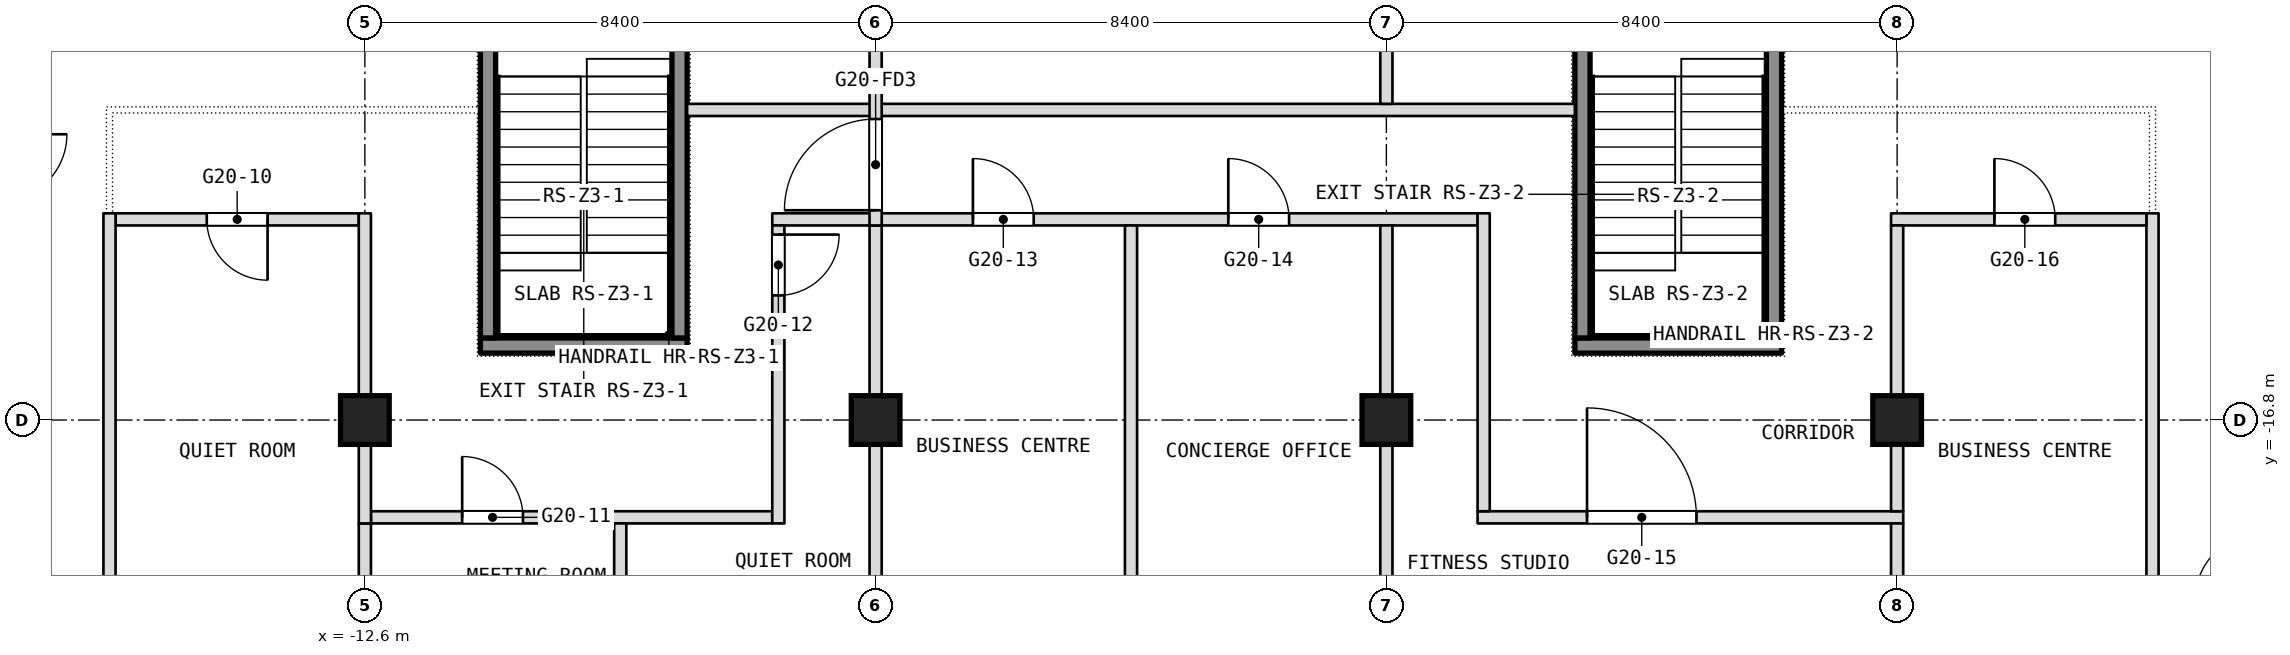
"""IFC4 building model, lengths in metres.
Left out: names, types, materials, properties, quantities, classifications, styles, units other than length and angle.
Written with IfcOpenShell. Run it as: python <this file> out.ifc"""

import sys

from ifc_helpers import new_model, si_unit, direction, frame, frame_2d, origin, origin_2d, place, context, subcontext, project, spatial, rectangle, extrude, element, fill, save


model = new_model("IFC4")
c1 = context("Model", 3, precision=1e-05, world=origin(), true_north=direction((0.0, 1.0)))
c2 = subcontext(c1, "Body", "Model", "MODEL_VIEW")
j1 = project(units=[si_unit("LENGTHUNIT", "METRE"), si_unit("PLANEANGLEUNIT", "RADIAN")], contexts=[c1])
p1 = place(None, origin())
s1 = spatial("IfcSite", under=j1, at=p1, CompositionType="ELEMENT")
p2 = place(p1, origin())
s2 = spatial("IfcBuilding", under=s1, at=p2, CompositionType="ELEMENT")
p3 = place(p2, frame((0.0, 0.0, 238.1)))
s3 = spatial("IfcBuildingStorey", under=s2, at=p3, CompositionType="ELEMENT", Elevation=238.1)
for number, where, z_axis, x_axis in (
    (1, (-12.6, -16.8, 0.0), (0.0, 0.0, 1.0), (1.0, 0.0, 0.0)),
    (2, (-4.2, -16.8, 0.0), (0.0, 0.0, 1.0), (1.0, 0.0, 0.0)),
    (3, (4.2, -16.8, 0.0), (0.0, 0.0, 1.0), (1.0, 0.0, 0.0)),
    (4, (12.6, -16.8, 0.0), (0.0, 0.0, 1.0), (1.0, 0.0, 0.0)),
):
    element("IfcColumn", number, at=place(p3, frame(where, z_axis=z_axis, x_axis=x_axis)), inside=s3, PredefinedType="COLUMN", context=c2, shape_type="SweptSolid", body=[
        extrude(rectangle(XDim=0.8, YDim=0.8, at=origin_2d()), origin(), (0.0, 0.0, 1.0), 3.6),
    ])
p4 = place(p3, frame((-12.5, -18.4, 0.0), z_axis=(0.0, 0.0, 1.0), x_axis=(1.0, 0.0, 0.0)))
e5 = element("IfcWall", 5, at=p4, inside=s3, PredefinedType="PARTITIONING", context=c2, shape_type="SweptSolid", body=[
    extrude(rectangle(XDim=6.6, YDim=0.2, at=frame_2d((3.3, 0.0))), origin(), (0.0, 0.0, 1.0), 3.34),
])
p5 = place(p4, frame((1.5, 0.0, 0.0)))
e6 = element("IfcOpeningElement", 6, at=p5, cuts=e5, PredefinedType="OPENING", context=c2, shape_type="SweptSolid", body=[
    extrude(rectangle(XDim=1.0, YDim=2.1, at=frame_2d((0.5, 1.05))), frame((0.0, 0.1, 0.0), z_axis=(0.0, -1.0, 0.0), x_axis=(1.0, 0.0, 0.0)), (0.0, 0.0, 1.0), 0.2),
])
p6 = place(p3, frame((5.7, -18.4, 0.0), z_axis=(0.0, 0.0, 1.0), x_axis=(1.0, 0.0, 0.0)))
e7 = element("IfcWall", 7, at=p6, inside=s3, PredefinedType="PARTITIONING", context=c2, shape_type="SweptSolid", body=[
    extrude(rectangle(XDim=7.0, YDim=0.2, at=frame_2d((3.5, 0.0))), origin(), (0.0, 0.0, 1.0), 3.34),
])
p7 = place(p6, frame((1.8, 0.0, 0.0)))
e8 = element("IfcOpeningElement", 8, at=p7, cuts=e7, PredefinedType="OPENING", context=c2, shape_type="SweptSolid", body=[
    extrude(rectangle(XDim=1.8, YDim=2.1, at=frame_2d((0.9, 1.05))), frame((0.0, 0.1, 0.0), z_axis=(0.0, -1.0, 0.0), x_axis=(1.0, 0.0, 0.0)), (0.0, 0.0, 1.0), 0.2),
])
p8 = place(p3, frame((16.8, -20.2, 0.0), z_axis=(0.0, 0.0, 1.0), x_axis=(0.0, 1.0, 0.0)))
e9 = element("IfcWall", 9, at=p8, inside=s3, PredefinedType="PARTITIONING", context=c2, shape_type="SweptSolid", body=[
    extrude(rectangle(XDim=6.8, YDim=0.2, at=frame_2d((3.4, 0.0))), origin(), (0.0, 0.0, 1.0), 3.34),
])
p9 = place(p3, frame((-16.7, -13.5, 0.0), z_axis=(0.0, 0.0, 1.0), x_axis=(1.0, 0.0, 0.0)))
e10 = element("IfcWall", 10, at=p9, inside=s3, PredefinedType="PARTITIONING", context=c2, shape_type="SweptSolid", body=[
    extrude(rectangle(XDim=4.0, YDim=0.2, at=frame_2d((2.0, 0.0))), origin(), (0.0, 0.0, 1.0), 3.34),
])
p10 = place(p9, frame((1.5, 0.0, 0.0)))
e11 = element("IfcOpeningElement", 11, at=p10, cuts=e10, PredefinedType="OPENING", context=c2, shape_type="SweptSolid", body=[
    extrude(rectangle(XDim=1.0, YDim=2.1, at=frame_2d((0.5, 1.05))), frame((0.0, 0.1, 0.0), z_axis=(0.0, -1.0, 0.0), x_axis=(1.0, 0.0, 0.0)), (0.0, 0.0, 1.0), 0.2),
])
p11 = place(p3, frame((-5.9, -13.5, 0.0), z_axis=(0.0, 0.0, 1.0), x_axis=(1.0, 0.0, 0.0)))
e12 = element("IfcWall", 12, at=p11, inside=s3, PredefinedType="PARTITIONING", context=c2, shape_type="SweptSolid", body=[
    extrude(rectangle(XDim=11.6, YDim=0.2, at=frame_2d((5.8, 0.0))), origin(), (0.0, 0.0, 1.0), 3.34),
])
p12 = place(p11, frame((3.3, 0.0, 0.0)))
e13 = element("IfcOpeningElement", 13, at=p12, cuts=e12, PredefinedType="OPENING", context=c2, shape_type="SweptSolid", body=[
    extrude(rectangle(XDim=1.0, YDim=2.1, at=frame_2d((0.5, 1.05))), frame((0.0, 0.1, 0.0), z_axis=(0.0, -1.0, 0.0), x_axis=(1.0, 0.0, 0.0)), (0.0, 0.0, 1.0), 0.2),
])
p13 = place(p11, frame((7.5, 0.0, 0.0)))
e14 = element("IfcOpeningElement", 14, at=p13, cuts=e12, PredefinedType="OPENING", context=c2, shape_type="SweptSolid", body=[
    extrude(rectangle(XDim=1.0, YDim=2.1, at=frame_2d((0.5, 1.05))), frame((0.0, 0.1, 0.0), z_axis=(0.0, -1.0, 0.0), x_axis=(1.0, 0.0, 0.0)), (0.0, 0.0, 1.0), 0.2),
])
p14 = place(p3, frame((12.5, -13.5, 0.0), z_axis=(0.0, 0.0, 1.0), x_axis=(1.0, 0.0, 0.0)))
e15 = element("IfcWall", 15, at=p14, inside=s3, PredefinedType="PARTITIONING", context=c2, shape_type="SweptSolid", body=[
    extrude(rectangle(XDim=4.2, YDim=0.2, at=frame_2d((2.1, 0.0))), origin(), (0.0, 0.0, 1.0), 3.34),
])
p15 = place(p14, frame((1.7, 0.0, 0.0)))
e16 = element("IfcOpeningElement", 16, at=p15, cuts=e15, PredefinedType="OPENING", context=c2, shape_type="SweptSolid", body=[
    extrude(rectangle(XDim=1.0, YDim=2.1, at=frame_2d((0.5, 1.05))), frame((0.0, 0.1, 0.0), z_axis=(0.0, -1.0, 0.0), x_axis=(1.0, 0.0, 0.0)), (0.0, 0.0, 1.0), 0.2),
])
p16 = place(p3, frame((12.6, -20.0, 0.0), z_axis=(0.0, 0.0, 1.0), x_axis=(0.0, 1.0, 0.0)))
e17 = element("IfcWall", 17, at=p16, inside=s3, PredefinedType="PARTITIONING", context=c2, shape_type="SweptSolid", body=[
    extrude(rectangle(XDim=1.5, YDim=0.2, at=frame_2d((0.75, 0.0))), origin(), (0.0, 0.0, 1.0), 3.34),
])
p17 = place(p3, frame((12.6, -18.3, 0.0), z_axis=(0.0, 0.0, 1.0), x_axis=(0.0, 1.0, 0.0)))
e18 = element("IfcWall", 18, at=p17, inside=s3, PredefinedType="PARTITIONING", context=c2, shape_type="SweptSolid", body=[
    extrude(rectangle(XDim=4.7, YDim=0.2, at=frame_2d((2.35, 0.0))), origin(), (0.0, 0.0, 1.0), 3.34),
])
p18 = place(p3, frame((-7.3, -11.7, 0.0), z_axis=(0.0, 0.0, 1.0), x_axis=(1.0, 0.0, 0.0)))
e19 = element("IfcWall", 19, at=p18, inside=s3, PredefinedType="PARTITIONING", context=c2, shape_type="SweptSolid", body=[
    extrude(rectangle(XDim=14.6, YDim=0.2, at=frame_2d((7.3, 0.0))), origin(), (0.0, 0.0, 1.0), 3.34),
])
p19 = place(p3, frame((5.8, -18.3, 0.0), z_axis=(0.0, 0.0, 1.0), x_axis=(0.0, 1.0, 0.0)))
e20 = element("IfcWall", 20, at=p19, inside=s3, PredefinedType="PARTITIONING", context=c2, shape_type="SweptSolid", body=[
    extrude(rectangle(XDim=4.9, YDim=0.2, at=frame_2d((2.45, 0.0))), origin(), (0.0, 0.0, 1.0), 3.34),
])
p20 = place(p3, frame((4.2, -20.0, 0.0), z_axis=(0.0, 0.0, 1.0), x_axis=(0.0, 1.0, 0.0)))
e21 = element("IfcWall", 21, at=p20, inside=s3, PredefinedType="PARTITIONING", context=c2, shape_type="SweptSolid", body=[
    extrude(rectangle(XDim=6.4, YDim=0.2, at=frame_2d((3.2, 0.0))), origin(), (0.0, 0.0, 1.0), 3.34),
])
p21 = place(p3, frame((4.2, -11.6, 0.0), z_axis=(0.0, 0.0, 1.0), x_axis=(0.0, 1.0, 0.0)))
e22 = element("IfcWall", 22, at=p21, inside=s3, PredefinedType="PARTITIONING", context=c2, shape_type="SweptSolid", body=[
    extrude(rectangle(XDim=9.7, YDim=0.2, at=frame_2d((4.85, 0.0))), origin(), (0.0, 0.0, 1.0), 3.34),
])
p22 = place(p3, frame((0.0, -20.0, 0.0), z_axis=(0.0, 0.0, 1.0), x_axis=(0.0, 1.0, 0.0)))
e23 = element("IfcWall", 23, at=p22, inside=s3, PredefinedType="PARTITIONING", context=c2, shape_type="SweptSolid", body=[
    extrude(rectangle(XDim=6.4, YDim=0.2, at=frame_2d((3.2, 0.0))), origin(), (0.0, 0.0, 1.0), 3.34),
])
p23 = place(p3, frame((-4.2, -22.0, 0.0), z_axis=(0.0, 0.0, 1.0), x_axis=(0.0, 1.0, 0.0)))
e24 = element("IfcWall", 24, at=p23, inside=s3, PredefinedType="PARTITIONING", context=c2, shape_type="SweptSolid", body=[
    extrude(rectangle(XDim=8.4, YDim=0.2, at=frame_2d((4.2, 0.0))), origin(), (0.0, 0.0, 1.0), 3.34),
])
p24 = place(p23, frame((0.25, 0.0, 0.0)))
e25 = element("IfcOpeningElement", 25, at=p24, cuts=e24, PredefinedType="OPENING", context=c2, shape_type="SweptSolid", body=[
    extrude(rectangle(XDim=1.5, YDim=2.1, at=frame_2d((0.75, 1.05))), frame((0.0, 0.1, 0.0), z_axis=(0.0, -1.0, 0.0), x_axis=(1.0, 0.0, 0.0)), (0.0, 0.0, 1.0), 0.2),
])
p25 = place(p3, frame((-4.2, -13.6, 0.0), z_axis=(0.0, 0.0, 1.0), x_axis=(0.0, 1.0, 0.0)))
e26 = element("IfcWall", 26, at=p25, inside=s3, PredefinedType="PARTITIONING", context=c2, shape_type="SweptSolid", body=[
    extrude(rectangle(XDim=13.6, YDim=0.2, at=frame_2d((6.8, 0.0))), origin(), (0.0, 0.0, 1.0), 3.34),
])
p26 = place(p25, frame((11.95, 0.0, 0.0)))
e27 = element("IfcOpeningElement", 27, at=p26, cuts=e26, PredefinedType="OPENING", context=c2, shape_type="SweptSolid", body=[
    extrude(rectangle(XDim=1.5, YDim=2.1, at=frame_2d((0.75, 1.05))), frame((0.0, 0.1, 0.0), z_axis=(0.0, -1.0, 0.0), x_axis=(1.0, 0.0, 0.0)), (0.0, 0.0, 1.0), 0.2),
])
p27 = place(p25, frame((0.25, 0.0, 0.0)))
e28 = element("IfcOpeningElement", 28, at=p27, cuts=e26, PredefinedType="OPENING", context=c2, shape_type="SweptSolid", body=[
    extrude(rectangle(XDim=1.5, YDim=2.1, at=frame_2d((0.75, 1.05))), frame((0.0, 0.1, 0.0), z_axis=(0.0, -1.0, 0.0), x_axis=(1.0, 0.0, 0.0)), (0.0, 0.0, 1.0), 0.2),
])
p28 = place(p3, frame((-5.8, -18.5, 0.0), z_axis=(0.0, 0.0, 1.0), x_axis=(0.0, 1.0, 0.0)))
e29 = element("IfcWall", 29, at=p28, inside=s3, PredefinedType="PARTITIONING", context=c2, shape_type="SweptSolid", body=[
    extrude(rectangle(XDim=4.9, YDim=0.2, at=frame_2d((2.45, 0.0))), origin(), (0.0, 0.0, 1.0), 3.34),
])
p29 = place(p28, frame((3.75, 0.0, 0.0)))
e30 = element("IfcOpeningElement", 30, at=p29, cuts=e29, PredefinedType="OPENING", context=c2, shape_type="SweptSolid", body=[
    extrude(rectangle(XDim=1.0, YDim=2.1, at=frame_2d((0.5, 1.05))), frame((0.0, 0.1, 0.0), z_axis=(0.0, -1.0, 0.0), x_axis=(1.0, 0.0, 0.0)), (0.0, 0.0, 1.0), 0.2),
])
for number, where, z_axis, x_axis in (
    (31, (-8.4, -20.0, 0.0), (0.0, 0.0, 1.0), (0.0, 1.0, 0.0)),
    (32, (-12.6, -20.0, 0.0), (0.0, 0.0, 1.0), (0.0, 1.0, 0.0)),
):
    element("IfcWall", number, at=place(p3, frame(where, z_axis=z_axis, x_axis=x_axis)), inside=s3, PredefinedType="PARTITIONING", context=c2, shape_type="SweptSolid", body=[
        extrude(rectangle(XDim=1.5, YDim=0.2, at=frame_2d((0.75, 0.0))), origin(), (0.0, 0.0, 1.0), 3.34),
    ])
p30 = place(p3, frame((-12.6, -18.5, 0.0), z_axis=(0.0, 0.0, 1.0), x_axis=(0.0, 1.0, 0.0)))
e33 = element("IfcWall", 33, at=p30, inside=s3, PredefinedType="PARTITIONING", context=c2, shape_type="SweptSolid", body=[
    extrude(rectangle(XDim=5.1, YDim=0.2, at=frame_2d((2.55, 0.0))), origin(), (0.0, 0.0, 1.0), 3.34),
])
p31 = place(p3, frame((-16.8, -20.2, 0.0), z_axis=(0.0, 0.0, 1.0), x_axis=(0.0, 1.0, 0.0)))
e34 = element("IfcWall", 34, at=p31, inside=s3, PredefinedType="PARTITIONING", context=c2, shape_type="SweptSolid", body=[
    extrude(rectangle(XDim=6.8, YDim=0.2, at=frame_2d((3.4, 0.0))), origin(), (0.0, 0.0, 1.0), 3.34),
])
p32 = place(p3, frame((-10.7, -15.575, 0.1), z_axis=(0.0, 0.0, 1.0), x_axis=(1.0, 0.0, 0.0)))
e35 = element("IfcWall", 35, at=p32, inside=s3, PredefinedType="SHEAR", context=c2, shape_type="SweptSolid", body=[
    extrude(rectangle(XDim=3.4, YDim=0.25, at=frame_2d((1.7, 0.0))), origin(), (0.0, 0.0, 1.0), 3.6),
])
for number, where, z_axis, x_axis in (
    (36, (-10.575, -15.45, 0.1), (0.0, 0.0, 1.0), (0.0, 1.0, 0.0)),
    (37, (-7.425, -15.45, 0.1), (0.0, 0.0, 1.0), (0.0, 1.0, 0.0)),
):
    element("IfcWall", number, at=place(p3, frame(where, z_axis=z_axis, x_axis=x_axis)), inside=s3, PredefinedType="SHEAR", context=c2, shape_type="SweptSolid", body=[
        extrude(rectangle(XDim=5.7, YDim=0.25, at=frame_2d((2.85, 0.0))), origin(), (0.0, 0.0, 1.0), 3.6),
    ])
p33 = place(p3, frame((7.3, -15.575, 0.1), z_axis=(0.0, 0.0, 1.0), x_axis=(1.0, 0.0, 0.0)))
e38 = element("IfcWall", 38, at=p33, inside=s3, PredefinedType="SHEAR", context=c2, shape_type="SweptSolid", body=[
    extrude(rectangle(XDim=3.4, YDim=0.25, at=frame_2d((1.7, 0.0))), origin(), (0.0, 0.0, 1.0), 3.6),
])
for number, where, z_axis, x_axis in (
    (39, (7.425, -15.45, 0.1), (0.0, 0.0, 1.0), (0.0, 1.0, 0.0)),
    (40, (10.575, -15.45, 0.1), (0.0, 0.0, 1.0), (0.0, 1.0, 0.0)),
):
    element("IfcWall", number, at=place(p3, frame(where, z_axis=z_axis, x_axis=x_axis)), inside=s3, PredefinedType="SHEAR", context=c2, shape_type="SweptSolid", body=[
        extrude(rectangle(XDim=5.7, YDim=0.25, at=frame_2d((2.85, 0.0))), origin(), (0.0, 0.0, 1.0), 3.6),
    ])
p34 = place(p5, origin())
e41 = element("IfcDoor", 41, at=p34, inside=s3, OperationType="SINGLE_SWING_RIGHT", PredefinedType="DOOR", context=c2, shape_type="SweptSolid", body=[
    extrude(rectangle(XDim=1.0, YDim=2.1, at=frame_2d((0.5, 1.05))), frame((0.0, 0.025, 0.0), z_axis=(0.0, -1.0, 0.0), x_axis=(1.0, 0.0, 0.0)), (0.0, 0.0, 1.0), 0.05),
])
fill(e6, e41)
p35 = place(p7, origin())
e42 = element("IfcDoor", 42, at=p35, inside=s3, OperationType="DOUBLE_DOOR_SINGLE_SWING", PredefinedType="DOOR", context=c2, shape_type="SweptSolid", body=[
    extrude(rectangle(XDim=1.8, YDim=2.1, at=frame_2d((0.9, 1.05))), frame((0.0, 0.025, 0.0), z_axis=(0.0, -1.0, 0.0), x_axis=(1.0, 0.0, 0.0)), (0.0, 0.0, 1.0), 0.05),
])
fill(e8, e42)
p36 = place(p10, origin())
e43 = element("IfcDoor", 43, at=p36, inside=s3, OperationType="SINGLE_SWING_RIGHT", PredefinedType="DOOR", context=c2, shape_type="SweptSolid", body=[
    extrude(rectangle(XDim=1.0, YDim=2.1, at=frame_2d((0.5, 1.05))), frame((0.0, 0.025, 0.0), z_axis=(0.0, -1.0, 0.0), x_axis=(1.0, 0.0, 0.0)), (0.0, 0.0, 1.0), 0.05),
])
fill(e11, e43)
p37 = place(p12, origin())
e44 = element("IfcDoor", 44, at=p37, inside=s3, OperationType="SINGLE_SWING_LEFT", PredefinedType="DOOR", context=c2, shape_type="SweptSolid", body=[
    extrude(rectangle(XDim=1.0, YDim=2.1, at=frame_2d((0.5, 1.05))), frame((0.0, 0.025, 0.0), z_axis=(0.0, -1.0, 0.0), x_axis=(1.0, 0.0, 0.0)), (0.0, 0.0, 1.0), 0.05),
])
fill(e13, e44)
p38 = place(p13, origin())
e45 = element("IfcDoor", 45, at=p38, inside=s3, OperationType="SINGLE_SWING_RIGHT", PredefinedType="DOOR", context=c2, shape_type="SweptSolid", body=[
    extrude(rectangle(XDim=1.0, YDim=2.1, at=frame_2d((0.5, 1.05))), frame((0.0, 0.025, 0.0), z_axis=(0.0, -1.0, 0.0), x_axis=(1.0, 0.0, 0.0)), (0.0, 0.0, 1.0), 0.05),
])
fill(e14, e45)
p39 = place(p15, origin())
e46 = element("IfcDoor", 46, at=p39, inside=s3, OperationType="SINGLE_SWING_RIGHT", PredefinedType="DOOR", context=c2, shape_type="SweptSolid", body=[
    extrude(rectangle(XDim=1.0, YDim=2.1, at=frame_2d((0.5, 1.05))), frame((0.0, 0.025, 0.0), z_axis=(0.0, -1.0, 0.0), x_axis=(1.0, 0.0, 0.0)), (0.0, 0.0, 1.0), 0.05),
])
fill(e16, e46)
p40 = place(p29, origin())
e47 = element("IfcDoor", 47, at=p40, inside=s3, OperationType="SINGLE_SWING_RIGHT", PredefinedType="DOOR", context=c2, shape_type="SweptSolid", body=[
    extrude(rectangle(XDim=1.0, YDim=2.1, at=frame_2d((0.5, 1.05))), frame((0.0, 0.025, 0.0), z_axis=(0.0, -1.0, 0.0), x_axis=(1.0, 0.0, 0.0)), (0.0, 0.0, 1.0), 0.05),
])
fill(e30, e47)
p41 = place(p27, origin())
e48 = element("IfcDoor", 48, at=p41, inside=s3, OperationType="DOUBLE_DOOR_DOUBLE_SWING", PredefinedType="DOOR", context=c2, shape_type="SweptSolid", body=[
    extrude(rectangle(XDim=1.5, YDim=2.1, at=frame_2d((0.75, 1.05))), frame((0.0, 0.025, 0.0), z_axis=(0.0, -1.0, 0.0), x_axis=(1.0, 0.0, 0.0)), (0.0, 0.0, 1.0), 0.05),
])
fill(e28, e48)
save(model, sys.argv[1])
